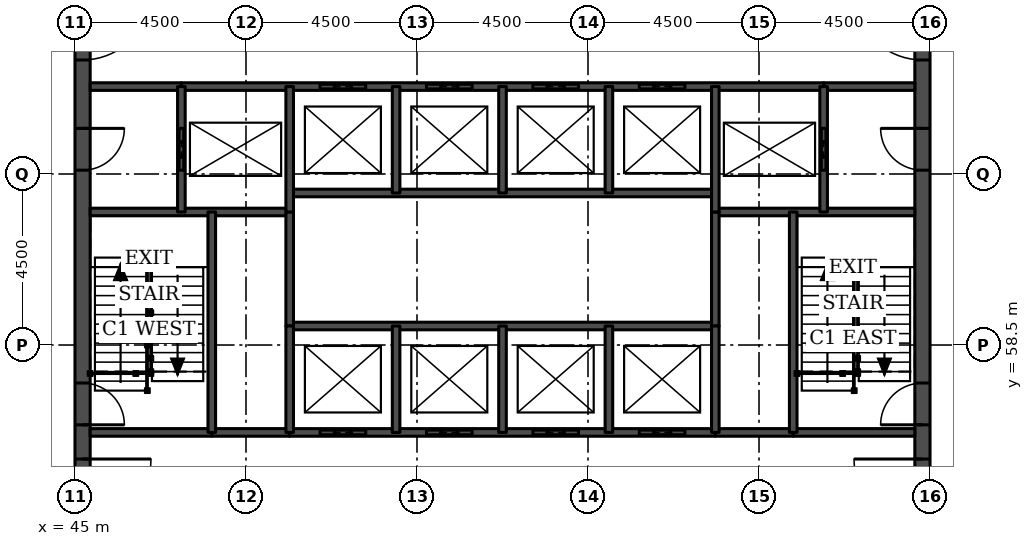
"""IFC4 building model, lengths in metres.
Left out: names, types, materials, properties, quantities, classifications, styles, units other than length and angle.
Written with IfcOpenShell. Run it as: python <this file> out.ifc"""

import sys

from ifc_helpers import new_model, si_unit, direction, frame, frame_2d, origin, place, context, subcontext, project, spatial, rectangle, extrude, element, fill, save


model = new_model("IFC4")
c1 = context("Model", 3, precision=1e-05, world=origin(), true_north=direction((0.0, 1.0)))
c2 = subcontext(c1, "Body", "Model", "MODEL_VIEW")
j1 = project(units=[si_unit("LENGTHUNIT", "METRE"), si_unit("PLANEANGLEUNIT", "RADIAN")], contexts=[c1])
p1 = place(None, origin())
s1 = spatial("IfcSite", under=j1, at=p1, CompositionType="ELEMENT")
p2 = place(p1, origin())
s2 = spatial("IfcBuilding", under=s1, at=p2, CompositionType="ELEMENT")
p3 = place(p2, frame((0.0, 0.0, 215.6)))
s3 = spatial("IfcBuildingStorey", under=s2, at=p3, CompositionType="ELEMENT", Elevation=215.6)
p4 = place(p3, frame((45.2, 49.5, 0.0), z_axis=(0.0, 0.0, 1.0), x_axis=(0.0, 1.0, 0.0)))
e1 = element("IfcWall", 1, at=p4, inside=s3, PredefinedType="SHEAR", context=c2, shape_type="SweptSolid", body=[
    extrude(rectangle(XDim=22.5, YDim=0.4, at=frame_2d((11.25, 0.0))), origin(), (0.0, 0.0, 1.0), 3.7),
])
p5 = place(p4, frame((4.2, 0.0, 0.0)))
e2 = element("IfcOpeningElement", 2, at=p5, cuts=e1, PredefinedType="OPENING", context=c2, shape_type="SweptSolid", body=[
    extrude(rectangle(XDim=1.8, YDim=2.1, at=frame_2d((0.9, 1.05))), frame((0.0, 0.21, 0.0), z_axis=(0.0, -1.0, 0.0), x_axis=(1.0, 0.0, 0.0)), (0.0, 0.0, 1.0), 0.42),
])
p6 = place(p4, frame((6.9, 0.0, 0.0)))
e3 = element("IfcOpeningElement", 3, at=p6, cuts=e1, PredefinedType="OPENING", context=c2, shape_type="SweptSolid", body=[
    extrude(rectangle(XDim=1.1, YDim=2.1, at=frame_2d((0.55, 1.05))), frame((0.0, 0.21, 0.0), z_axis=(0.0, -1.0, 0.0), x_axis=(1.0, 0.0, 0.0)), (0.0, 0.0, 1.0), 0.42),
])
p7 = place(p4, frame((13.6, 0.0, 0.0)))
e4 = element("IfcOpeningElement", 4, at=p7, cuts=e1, PredefinedType="OPENING", context=c2, shape_type="SweptSolid", body=[
    extrude(rectangle(XDim=1.1, YDim=2.1, at=frame_2d((0.55, 1.05))), frame((0.0, 0.21, 0.0), z_axis=(0.0, -1.0, 0.0), x_axis=(1.0, 0.0, 0.0)), (0.0, 0.0, 1.0), 0.42),
])
p8 = place(p4, frame((16.5, 0.0, 0.0)))
e5 = element("IfcOpeningElement", 5, at=p8, cuts=e1, PredefinedType="OPENING", context=c2, shape_type="SweptSolid", body=[
    extrude(rectangle(XDim=1.8, YDim=2.1, at=frame_2d((0.9, 1.05))), frame((0.0, 0.21, 0.0), z_axis=(0.0, -1.0, 0.0), x_axis=(1.0, 0.0, 0.0)), (0.0, 0.0, 1.0), 0.42),
])
p9 = place(p3, frame((67.3, 49.5, 0.0), z_axis=(0.0, 0.0, 1.0), x_axis=(0.0, 1.0, 0.0)))
e6 = element("IfcWall", 6, at=p9, inside=s3, PredefinedType="SHEAR", context=c2, shape_type="SweptSolid", body=[
    extrude(rectangle(XDim=22.5, YDim=0.4, at=frame_2d((11.25, 0.0))), origin(), (0.0, 0.0, 1.0), 3.7),
])
p10 = place(p9, frame((4.2, 0.0, 0.0)))
e7 = element("IfcOpeningElement", 7, at=p10, cuts=e6, PredefinedType="OPENING", context=c2, shape_type="SweptSolid", body=[
    extrude(rectangle(XDim=1.8, YDim=2.1, at=frame_2d((0.9, 1.05))), frame((0.0, 0.21, 0.0), z_axis=(0.0, -1.0, 0.0), x_axis=(1.0, 0.0, 0.0)), (0.0, 0.0, 1.0), 0.42),
])
p11 = place(p9, frame((6.9, 0.0, 0.0)))
e8 = element("IfcOpeningElement", 8, at=p11, cuts=e6, PredefinedType="OPENING", context=c2, shape_type="SweptSolid", body=[
    extrude(rectangle(XDim=1.1, YDim=2.1, at=frame_2d((0.55, 1.05))), frame((0.0, 0.21, 0.0), z_axis=(0.0, -1.0, 0.0), x_axis=(1.0, 0.0, 0.0)), (0.0, 0.0, 1.0), 0.42),
])
p12 = place(p9, frame((13.6, 0.0, 0.0)))
e9 = element("IfcOpeningElement", 9, at=p12, cuts=e6, PredefinedType="OPENING", context=c2, shape_type="SweptSolid", body=[
    extrude(rectangle(XDim=1.1, YDim=2.1, at=frame_2d((0.55, 1.05))), frame((0.0, 0.21, 0.0), z_axis=(0.0, -1.0, 0.0), x_axis=(1.0, 0.0, 0.0)), (0.0, 0.0, 1.0), 0.42),
])
p13 = place(p9, frame((16.5, 0.0, 0.0)))
e10 = element("IfcOpeningElement", 10, at=p13, cuts=e6, PredefinedType="OPENING", context=c2, shape_type="SweptSolid", body=[
    extrude(rectangle(XDim=1.8, YDim=2.1, at=frame_2d((0.9, 1.05))), frame((0.0, 0.21, 0.0), z_axis=(0.0, -1.0, 0.0), x_axis=(1.0, 0.0, 0.0)), (0.0, 0.0, 1.0), 0.42),
])
for number, where, z_axis, x_axis in (
    (11, (48.6, 56.2, 0.0), (0.0, 0.0, 1.0), (1.0, 0.0, 0.0)),
    (12, (61.85, 56.2, 0.0), (0.0, 0.0, 1.0), (1.0, 0.0, 0.0)),
):
    element("IfcWall", number, at=place(p3, frame(where, z_axis=z_axis, x_axis=x_axis)), inside=s3, PredefinedType="SOLIDWALL", context=c2, shape_type="SweptSolid", body=[
        extrude(rectangle(XDim=2.05, YDim=0.2, at=frame_2d((1.025, 0.0))), origin(), (0.0, 0.0, 1.0), 3.55),
    ])
p14 = place(p3, frame((45.4, 56.2, 0.0), z_axis=(0.0, 0.0, 1.0), x_axis=(1.0, 0.0, 0.0)))
e13 = element("IfcWall", 13, at=p14, inside=s3, PredefinedType="SOLIDWALL", context=c2, shape_type="SweptSolid", body=[
    extrude(rectangle(XDim=3.2, YDim=0.2, at=frame_2d((1.6, 0.0))), origin(), (0.0, 0.0, 1.0), 3.55),
])
p15 = place(p3, frame((50.65, 56.2, 0.0), z_axis=(0.0, 0.0, 1.0), x_axis=(1.0, 0.0, 0.0)))
e14 = element("IfcWall", 14, at=p15, inside=s3, PredefinedType="SOLIDWALL", context=c2, shape_type="SweptSolid", body=[
    extrude(rectangle(XDim=11.2, YDim=0.2, at=frame_2d((5.6, 0.0))), origin(), (0.0, 0.0, 1.0), 3.55),
])
p16 = place(p15, frame((0.8, 0.0, 0.0)))
e15 = element("IfcOpeningElement", 15, at=p16, cuts=e14, PredefinedType="OPENING", context=c2, shape_type="SweptSolid", body=[
    extrude(rectangle(XDim=1.2, YDim=2.1, at=frame_2d((0.6, 1.05))), frame((0.0, 0.11, 0.0), z_axis=(0.0, -1.0, 0.0), x_axis=(1.0, 0.0, 0.0)), (0.0, 0.0, 1.0), 0.22),
])
p17 = place(p15, frame((3.6, 0.0, 0.0)))
e16 = element("IfcOpeningElement", 16, at=p17, cuts=e14, PredefinedType="OPENING", context=c2, shape_type="SweptSolid", body=[
    extrude(rectangle(XDim=1.2, YDim=2.1, at=frame_2d((0.6, 1.05))), frame((0.0, 0.11, 0.0), z_axis=(0.0, -1.0, 0.0), x_axis=(1.0, 0.0, 0.0)), (0.0, 0.0, 1.0), 0.22),
])
p18 = place(p15, frame((6.4, 0.0, 0.0)))
e17 = element("IfcOpeningElement", 17, at=p18, cuts=e14, PredefinedType="OPENING", context=c2, shape_type="SweptSolid", body=[
    extrude(rectangle(XDim=1.2, YDim=2.1, at=frame_2d((0.6, 1.05))), frame((0.0, 0.11, 0.0), z_axis=(0.0, -1.0, 0.0), x_axis=(1.0, 0.0, 0.0)), (0.0, 0.0, 1.0), 0.22),
])
p19 = place(p15, frame((9.2, 0.0, 0.0)))
e18 = element("IfcOpeningElement", 18, at=p19, cuts=e14, PredefinedType="OPENING", context=c2, shape_type="SweptSolid", body=[
    extrude(rectangle(XDim=1.2, YDim=2.1, at=frame_2d((0.6, 1.05))), frame((0.0, 0.11, 0.0), z_axis=(0.0, -1.0, 0.0), x_axis=(1.0, 0.0, 0.0)), (0.0, 0.0, 1.0), 0.22),
])
p20 = place(p3, frame((63.9, 56.2, 0.0), z_axis=(0.0, 0.0, 1.0), x_axis=(1.0, 0.0, 0.0)))
e19 = element("IfcWall", 19, at=p20, inside=s3, PredefinedType="SOLIDWALL", context=c2, shape_type="SweptSolid", body=[
    extrude(rectangle(XDim=3.2, YDim=0.2, at=frame_2d((1.6, 0.0))), origin(), (0.0, 0.0, 1.0), 3.55),
])
p21 = place(p3, frame((50.65, 59.0, 0.0), z_axis=(0.0, 0.0, 1.0), x_axis=(1.0, 0.0, 0.0)))
e20 = element("IfcWall", 20, at=p21, inside=s3, PredefinedType="SOLIDWALL", context=c2, shape_type="SweptSolid", body=[
    extrude(rectangle(XDim=11.2, YDim=0.2, at=frame_2d((5.6, 0.0))), origin(), (0.0, 0.0, 1.0), 3.7),
])
for number, where, z_axis, x_axis in (
    (21, (45.4, 62.0, 0.0), (0.0, 0.0, 1.0), (1.0, 0.0, 0.0)),
    (22, (61.85, 62.0, 0.0), (0.0, 0.0, 1.0), (1.0, 0.0, 0.0)),
):
    element("IfcWall", number, at=place(p3, frame(where, z_axis=z_axis, x_axis=x_axis)), inside=s3, PredefinedType="SOLIDWALL", context=c2, shape_type="SweptSolid", body=[
        extrude(rectangle(XDim=5.25, YDim=0.2, at=frame_2d((2.625, 0.0))), origin(), (0.0, 0.0, 1.0), 3.55),
    ])
p22 = place(p3, frame((50.65, 62.5, 0.0), z_axis=(0.0, 0.0, 1.0), x_axis=(1.0, 0.0, 0.0)))
e23 = element("IfcWall", 23, at=p22, inside=s3, PredefinedType="SOLIDWALL", context=c2, shape_type="SweptSolid", body=[
    extrude(rectangle(XDim=11.2, YDim=0.2, at=frame_2d((5.6, 0.0))), origin(), (0.0, 0.0, 1.0), 3.7),
])
for number, where, z_axis, x_axis in (
    (24, (45.4, 65.3, 0.0), (0.0, 0.0, 1.0), (1.0, 0.0, 0.0)),
    (25, (64.7, 65.3, 0.0), (0.0, 0.0, 1.0), (1.0, 0.0, 0.0)),
):
    element("IfcWall", number, at=place(p3, frame(where, z_axis=z_axis, x_axis=x_axis)), inside=s3, PredefinedType="SOLIDWALL", context=c2, shape_type="SweptSolid", body=[
        extrude(rectangle(XDim=2.4, YDim=0.2, at=frame_2d((1.2, 0.0))), origin(), (0.0, 0.0, 1.0), 3.55),
    ])
p23 = place(p3, frame((47.8, 65.3, 0.0), z_axis=(0.0, 0.0, 1.0), x_axis=(1.0, 0.0, 0.0)))
e26 = element("IfcWall", 26, at=p23, inside=s3, PredefinedType="SOLIDWALL", context=c2, shape_type="SweptSolid", body=[
    extrude(rectangle(XDim=16.9, YDim=0.2, at=frame_2d((8.45, 0.0))), origin(), (0.0, 0.0, 1.0), 3.55),
])
p24 = place(p23, frame((3.65, 0.0, 0.0)))
e27 = element("IfcOpeningElement", 27, at=p24, cuts=e26, PredefinedType="OPENING", context=c2, shape_type="SweptSolid", body=[
    extrude(rectangle(XDim=1.2, YDim=2.1, at=frame_2d((0.6, 1.05))), frame((0.0, 0.11, 0.0), z_axis=(0.0, -1.0, 0.0), x_axis=(1.0, 0.0, 0.0)), (0.0, 0.0, 1.0), 0.22),
])
p25 = place(p23, frame((6.45, 0.0, 0.0)))
e28 = element("IfcOpeningElement", 28, at=p25, cuts=e26, PredefinedType="OPENING", context=c2, shape_type="SweptSolid", body=[
    extrude(rectangle(XDim=1.2, YDim=2.1, at=frame_2d((0.6, 1.05))), frame((0.0, 0.11, 0.0), z_axis=(0.0, -1.0, 0.0), x_axis=(1.0, 0.0, 0.0)), (0.0, 0.0, 1.0), 0.22),
])
p26 = place(p23, frame((9.25, 0.0, 0.0)))
e29 = element("IfcOpeningElement", 29, at=p26, cuts=e26, PredefinedType="OPENING", context=c2, shape_type="SweptSolid", body=[
    extrude(rectangle(XDim=1.2, YDim=2.1, at=frame_2d((0.6, 1.05))), frame((0.0, 0.11, 0.0), z_axis=(0.0, -1.0, 0.0), x_axis=(1.0, 0.0, 0.0)), (0.0, 0.0, 1.0), 0.22),
])
p27 = place(p23, frame((12.05, 0.0, 0.0)))
e30 = element("IfcOpeningElement", 30, at=p27, cuts=e26, PredefinedType="OPENING", context=c2, shape_type="SweptSolid", body=[
    extrude(rectangle(XDim=1.2, YDim=2.1, at=frame_2d((0.6, 1.05))), frame((0.0, 0.11, 0.0), z_axis=(0.0, -1.0, 0.0), x_axis=(1.0, 0.0, 0.0)), (0.0, 0.0, 1.0), 0.22),
])
p28 = place(p3, frame((47.8, 62.0, 0.0), z_axis=(0.0, 0.0, 1.0), x_axis=(0.0, 1.0, 0.0)))
e31 = element("IfcWall", 31, at=p28, inside=s3, PredefinedType="SOLIDWALL", context=c2, shape_type="SweptSolid", body=[
    extrude(rectangle(XDim=3.3, YDim=0.2, at=frame_2d((1.65, 0.0))), origin(), (0.0, 0.0, 1.0), 3.55),
])
p29 = place(p28, frame((1.1, 0.0, 0.0)))
e32 = element("IfcOpeningElement", 32, at=p29, cuts=e31, PredefinedType="OPENING", context=c2, shape_type="SweptSolid", body=[
    extrude(rectangle(XDim=1.1, YDim=2.1, at=frame_2d((0.55, 1.05))), frame((0.0, 0.11, 0.0), z_axis=(0.0, -1.0, 0.0), x_axis=(1.0, 0.0, 0.0)), (0.0, 0.0, 1.0), 0.22),
])
p30 = place(p3, frame((48.6, 56.2, 0.0), z_axis=(0.0, 0.0, 1.0), x_axis=(0.0, 1.0, 0.0)))
e33 = element("IfcWall", 33, at=p30, inside=s3, PredefinedType="SOLIDWALL", context=c2, shape_type="SweptSolid", body=[
    extrude(rectangle(XDim=5.8, YDim=0.2, at=frame_2d((2.9, 0.0))), origin(), (0.0, 0.0, 1.0), 3.55),
])
p31 = place(p3, frame((50.65, 59.0, 0.0), z_axis=(0.0, 0.0, 1.0), x_axis=(0.0, 1.0, 0.0)))
e34 = element("IfcWall", 34, at=p31, inside=s3, PredefinedType="SOLIDWALL", context=c2, shape_type="SweptSolid", body=[
    extrude(rectangle(XDim=3.0, YDim=0.2, at=frame_2d((1.5, 0.0))), origin(), (0.0, 0.0, 1.0), 3.7),
])
p32 = place(p3, frame((50.65, 56.2, 0.0), z_axis=(0.0, 0.0, 1.0), x_axis=(0.0, 1.0, 0.0)))
e35 = element("IfcWall", 35, at=p32, inside=s3, PredefinedType="SOLIDWALL", context=c2, shape_type="SweptSolid", body=[
    extrude(rectangle(XDim=2.8, YDim=0.2, at=frame_2d((1.4, 0.0))), origin(), (0.0, 0.0, 1.0), 3.55),
])
p33 = place(p3, frame((50.65, 62.0, 0.0), z_axis=(0.0, 0.0, 1.0), x_axis=(0.0, 1.0, 0.0)))
e36 = element("IfcWall", 36, at=p33, inside=s3, PredefinedType="SOLIDWALL", context=c2, shape_type="SweptSolid", body=[
    extrude(rectangle(XDim=3.3, YDim=0.2, at=frame_2d((1.65, 0.0))), origin(), (0.0, 0.0, 1.0), 3.55),
])
for number, where, z_axis, x_axis in (
    (37, (53.45, 56.2, 0.0), (0.0, 0.0, 1.0), (0.0, 1.0, 0.0)),
    (38, (53.45, 62.5, 0.0), (0.0, 0.0, 1.0), (0.0, 1.0, 0.0)),
    (39, (56.25, 56.2, 0.0), (0.0, 0.0, 1.0), (0.0, 1.0, 0.0)),
    (40, (56.25, 62.5, 0.0), (0.0, 0.0, 1.0), (0.0, 1.0, 0.0)),
    (41, (59.05, 56.2, 0.0), (0.0, 0.0, 1.0), (0.0, 1.0, 0.0)),
    (42, (59.05, 62.5, 0.0), (0.0, 0.0, 1.0), (0.0, 1.0, 0.0)),
):
    element("IfcWall", number, at=place(p3, frame(where, z_axis=z_axis, x_axis=x_axis)), inside=s3, PredefinedType="SOLIDWALL", context=c2, shape_type="SweptSolid", body=[
        extrude(rectangle(XDim=2.8, YDim=0.2, at=frame_2d((1.4, 0.0))), origin(), (0.0, 0.0, 1.0), 3.55),
    ])
p34 = place(p3, frame((61.85, 59.0, 0.0), z_axis=(0.0, 0.0, 1.0), x_axis=(0.0, 1.0, 0.0)))
e43 = element("IfcWall", 43, at=p34, inside=s3, PredefinedType="SOLIDWALL", context=c2, shape_type="SweptSolid", body=[
    extrude(rectangle(XDim=3.0, YDim=0.2, at=frame_2d((1.5, 0.0))), origin(), (0.0, 0.0, 1.0), 3.7),
])
p35 = place(p3, frame((61.85, 56.2, 0.0), z_axis=(0.0, 0.0, 1.0), x_axis=(0.0, 1.0, 0.0)))
e44 = element("IfcWall", 44, at=p35, inside=s3, PredefinedType="SOLIDWALL", context=c2, shape_type="SweptSolid", body=[
    extrude(rectangle(XDim=2.8, YDim=0.2, at=frame_2d((1.4, 0.0))), origin(), (0.0, 0.0, 1.0), 3.55),
])
p36 = place(p3, frame((61.85, 62.0, 0.0), z_axis=(0.0, 0.0, 1.0), x_axis=(0.0, 1.0, 0.0)))
e45 = element("IfcWall", 45, at=p36, inside=s3, PredefinedType="SOLIDWALL", context=c2, shape_type="SweptSolid", body=[
    extrude(rectangle(XDim=3.3, YDim=0.2, at=frame_2d((1.65, 0.0))), origin(), (0.0, 0.0, 1.0), 3.55),
])
p37 = place(p3, frame((63.9, 56.2, 0.0), z_axis=(0.0, 0.0, 1.0), x_axis=(0.0, 1.0, 0.0)))
e46 = element("IfcWall", 46, at=p37, inside=s3, PredefinedType="SOLIDWALL", context=c2, shape_type="SweptSolid", body=[
    extrude(rectangle(XDim=5.8, YDim=0.2, at=frame_2d((2.9, 0.0))), origin(), (0.0, 0.0, 1.0), 3.55),
])
p38 = place(p3, frame((64.7, 62.0, 0.0), z_axis=(0.0, 0.0, 1.0), x_axis=(0.0, 1.0, 0.0)))
e47 = element("IfcWall", 47, at=p38, inside=s3, PredefinedType="SOLIDWALL", context=c2, shape_type="SweptSolid", body=[
    extrude(rectangle(XDim=3.3, YDim=0.2, at=frame_2d((1.65, 0.0))), origin(), (0.0, 0.0, 1.0), 3.55),
])
p39 = place(p38, frame((1.1, 0.0, 0.0)))
e48 = element("IfcOpeningElement", 48, at=p39, cuts=e47, PredefinedType="OPENING", context=c2, shape_type="SweptSolid", body=[
    extrude(rectangle(XDim=1.1, YDim=2.1, at=frame_2d((0.55, 1.05))), frame((0.0, 0.11, 0.0), z_axis=(0.0, -1.0, 0.0), x_axis=(1.0, 0.0, 0.0)), (0.0, 0.0, 1.0), 0.22),
])
p40 = place(p16, origin())
e49 = element("IfcDoor", 49, at=p40, inside=s3, OperationType="DOUBLE_DOOR_SLIDING", PredefinedType="DOOR", context=c2, shape_type="SweptSolid", body=[
    extrude(rectangle(XDim=1.2, YDim=2.1, at=frame_2d((0.6, 1.05))), frame((0.0, 0.025, 0.0), z_axis=(0.0, -1.0, 0.0), x_axis=(1.0, 0.0, 0.0)), (0.0, 0.0, 1.0), 0.05),
])
fill(e15, e49)
p41 = place(p17, origin())
e50 = element("IfcDoor", 50, at=p41, inside=s3, OperationType="DOUBLE_DOOR_SLIDING", PredefinedType="DOOR", context=c2, shape_type="SweptSolid", body=[
    extrude(rectangle(XDim=1.2, YDim=2.1, at=frame_2d((0.6, 1.05))), frame((0.0, 0.025, 0.0), z_axis=(0.0, -1.0, 0.0), x_axis=(1.0, 0.0, 0.0)), (0.0, 0.0, 1.0), 0.05),
])
fill(e16, e50)
p42 = place(p18, origin())
e51 = element("IfcDoor", 51, at=p42, inside=s3, OperationType="DOUBLE_DOOR_SLIDING", PredefinedType="DOOR", context=c2, shape_type="SweptSolid", body=[
    extrude(rectangle(XDim=1.2, YDim=2.1, at=frame_2d((0.6, 1.05))), frame((0.0, 0.025, 0.0), z_axis=(0.0, -1.0, 0.0), x_axis=(1.0, 0.0, 0.0)), (0.0, 0.0, 1.0), 0.05),
])
fill(e17, e51)
p43 = place(p19, origin())
e52 = element("IfcDoor", 52, at=p43, inside=s3, OperationType="DOUBLE_DOOR_SLIDING", PredefinedType="DOOR", context=c2, shape_type="SweptSolid", body=[
    extrude(rectangle(XDim=1.2, YDim=2.1, at=frame_2d((0.6, 1.05))), frame((0.0, 0.025, 0.0), z_axis=(0.0, -1.0, 0.0), x_axis=(1.0, 0.0, 0.0)), (0.0, 0.0, 1.0), 0.05),
])
fill(e18, e52)
p44 = place(p24, origin())
e53 = element("IfcDoor", 53, at=p44, inside=s3, OperationType="DOUBLE_DOOR_SLIDING", PredefinedType="DOOR", context=c2, shape_type="SweptSolid", body=[
    extrude(rectangle(XDim=1.2, YDim=2.1, at=frame_2d((0.6, 1.05))), frame((0.0, 0.025, 0.0), z_axis=(0.0, -1.0, 0.0), x_axis=(1.0, 0.0, 0.0)), (0.0, 0.0, 1.0), 0.05),
])
fill(e27, e53)
p45 = place(p25, origin())
e54 = element("IfcDoor", 54, at=p45, inside=s3, OperationType="DOUBLE_DOOR_SLIDING", PredefinedType="DOOR", context=c2, shape_type="SweptSolid", body=[
    extrude(rectangle(XDim=1.2, YDim=2.1, at=frame_2d((0.6, 1.05))), frame((0.0, 0.025, 0.0), z_axis=(0.0, -1.0, 0.0), x_axis=(1.0, 0.0, 0.0)), (0.0, 0.0, 1.0), 0.05),
])
fill(e28, e54)
p46 = place(p26, origin())
e55 = element("IfcDoor", 55, at=p46, inside=s3, OperationType="DOUBLE_DOOR_SLIDING", PredefinedType="DOOR", context=c2, shape_type="SweptSolid", body=[
    extrude(rectangle(XDim=1.2, YDim=2.1, at=frame_2d((0.6, 1.05))), frame((0.0, 0.025, 0.0), z_axis=(0.0, -1.0, 0.0), x_axis=(1.0, 0.0, 0.0)), (0.0, 0.0, 1.0), 0.05),
])
fill(e29, e55)
p47 = place(p27, origin())
e56 = element("IfcDoor", 56, at=p47, inside=s3, OperationType="DOUBLE_DOOR_SLIDING", PredefinedType="DOOR", context=c2, shape_type="SweptSolid", body=[
    extrude(rectangle(XDim=1.2, YDim=2.1, at=frame_2d((0.6, 1.05))), frame((0.0, 0.025, 0.0), z_axis=(0.0, -1.0, 0.0), x_axis=(1.0, 0.0, 0.0)), (0.0, 0.0, 1.0), 0.05),
])
fill(e30, e56)
p48 = place(p29, origin())
e57 = element("IfcDoor", 57, at=p48, inside=s3, OperationType="DOUBLE_DOOR_SLIDING", PredefinedType="DOOR", context=c2, shape_type="SweptSolid", body=[
    extrude(rectangle(XDim=1.1, YDim=2.1, at=frame_2d((0.55, 1.05))), frame((0.0, 0.025, 0.0), z_axis=(0.0, -1.0, 0.0), x_axis=(1.0, 0.0, 0.0)), (0.0, 0.0, 1.0), 0.05),
])
fill(e32, e57)
p49 = place(p39, origin())
e58 = element("IfcDoor", 58, at=p49, inside=s3, OperationType="DOUBLE_DOOR_SLIDING", PredefinedType="DOOR", context=c2, shape_type="SweptSolid", body=[
    extrude(rectangle(XDim=1.1, YDim=2.1, at=frame_2d((0.55, 1.05))), frame((0.0, 0.025, 0.0), z_axis=(0.0, -1.0, 0.0), x_axis=(1.0, 0.0, 0.0)), (0.0, 0.0, 1.0), 0.05),
])
fill(e48, e58)
p50 = place(p5, frame((1.8, 0.0, 0.0), z_axis=(0.0, 0.0, 1.0), x_axis=(-1.0, 0.0, 0.0)))
e59 = element("IfcDoor", 59, at=p50, inside=s3, OperationType="SINGLE_SWING_LEFT", PredefinedType="DOOR", context=c2, shape_type="SweptSolid", body=[
    extrude(rectangle(XDim=1.8, YDim=2.1, at=frame_2d((0.9, 1.05))), frame((0.0, 0.025, 0.0), z_axis=(0.0, -1.0, 0.0), x_axis=(1.0, 0.0, 0.0)), (0.0, 0.0, 1.0), 0.05),
])
fill(e2, e59)
p51 = place(p6, frame((1.1, 0.0, 0.0), z_axis=(0.0, 0.0, 1.0), x_axis=(-1.0, 0.0, 0.0)))
e60 = element("IfcDoor", 60, at=p51, inside=s3, OperationType="SINGLE_SWING_RIGHT", PredefinedType="DOOR", context=c2, shape_type="SweptSolid", body=[
    extrude(rectangle(XDim=1.1, YDim=2.1, at=frame_2d((0.55, 1.05))), frame((0.0, 0.025, 0.0), z_axis=(0.0, -1.0, 0.0), x_axis=(1.0, 0.0, 0.0)), (0.0, 0.0, 1.0), 0.05),
])
fill(e3, e60)
p52 = place(p7, frame((1.1, 0.0, 0.0), z_axis=(0.0, 0.0, 1.0), x_axis=(-1.0, 0.0, 0.0)))
e61 = element("IfcDoor", 61, at=p52, inside=s3, OperationType="SINGLE_SWING_LEFT", PredefinedType="DOOR", context=c2, shape_type="SweptSolid", body=[
    extrude(rectangle(XDim=1.1, YDim=2.1, at=frame_2d((0.55, 1.05))), frame((0.0, 0.025, 0.0), z_axis=(0.0, -1.0, 0.0), x_axis=(1.0, 0.0, 0.0)), (0.0, 0.0, 1.0), 0.05),
])
fill(e4, e61)
p53 = place(p8, frame((1.8, 0.0, 0.0), z_axis=(0.0, 0.0, 1.0), x_axis=(-1.0, 0.0, 0.0)))
e62 = element("IfcDoor", 62, at=p53, inside=s3, OperationType="SINGLE_SWING_LEFT", PredefinedType="DOOR", context=c2, shape_type="SweptSolid", body=[
    extrude(rectangle(XDim=1.8, YDim=2.1, at=frame_2d((0.9, 1.05))), frame((0.0, 0.025, 0.0), z_axis=(0.0, -1.0, 0.0), x_axis=(1.0, 0.0, 0.0)), (0.0, 0.0, 1.0), 0.05),
])
fill(e5, e62)
p54 = place(p10, origin())
e63 = element("IfcDoor", 63, at=p54, inside=s3, OperationType="SINGLE_SWING_RIGHT", PredefinedType="DOOR", context=c2, shape_type="SweptSolid", body=[
    extrude(rectangle(XDim=1.8, YDim=2.1, at=frame_2d((0.9, 1.05))), frame((0.0, 0.025, 0.0), z_axis=(0.0, -1.0, 0.0), x_axis=(1.0, 0.0, 0.0)), (0.0, 0.0, 1.0), 0.05),
])
fill(e7, e63)
p55 = place(p11, origin())
e64 = element("IfcDoor", 64, at=p55, inside=s3, OperationType="SINGLE_SWING_LEFT", PredefinedType="DOOR", context=c2, shape_type="SweptSolid", body=[
    extrude(rectangle(XDim=1.1, YDim=2.1, at=frame_2d((0.55, 1.05))), frame((0.0, 0.025, 0.0), z_axis=(0.0, -1.0, 0.0), x_axis=(1.0, 0.0, 0.0)), (0.0, 0.0, 1.0), 0.05),
])
fill(e8, e64)
p56 = place(p12, origin())
e65 = element("IfcDoor", 65, at=p56, inside=s3, OperationType="SINGLE_SWING_RIGHT", PredefinedType="DOOR", context=c2, shape_type="SweptSolid", body=[
    extrude(rectangle(XDim=1.1, YDim=2.1, at=frame_2d((0.55, 1.05))), frame((0.0, 0.025, 0.0), z_axis=(0.0, -1.0, 0.0), x_axis=(1.0, 0.0, 0.0)), (0.0, 0.0, 1.0), 0.05),
])
fill(e9, e65)
p57 = place(p13, origin())
e66 = element("IfcDoor", 66, at=p57, inside=s3, OperationType="SINGLE_SWING_RIGHT", PredefinedType="DOOR", context=c2, shape_type="SweptSolid", body=[
    extrude(rectangle(XDim=1.8, YDim=2.1, at=frame_2d((0.9, 1.05))), frame((0.0, 0.025, 0.0), z_axis=(0.0, -1.0, 0.0), x_axis=(1.0, 0.0, 0.0)), (0.0, 0.0, 1.0), 0.05),
])
fill(e10, e66)
save(model, sys.argv[1])
